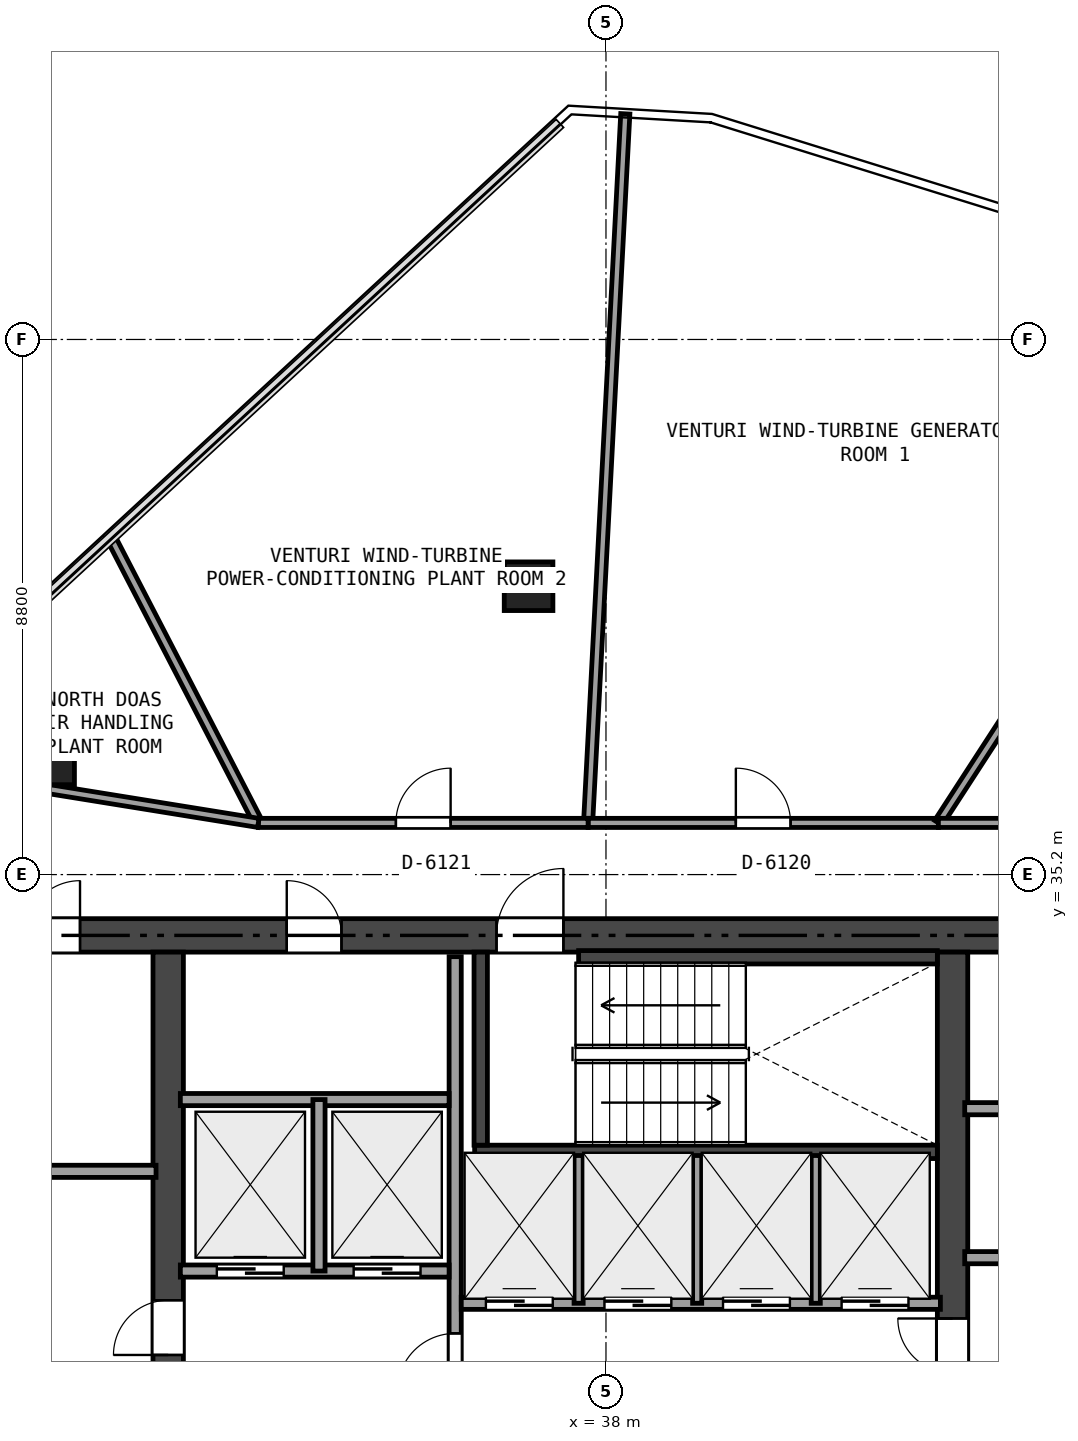
"""IFC4 building model, lengths in metres.
Left out: names, types, materials, properties, quantities, classifications, styles, units other than length and angle.
Written with IfcOpenShell. Run it as: python <this file> out.ifc"""

import sys

from ifc_helpers import new_model, si_unit, direction, frame, frame_2d, origin, origin_2d, place, context, subcontext, project, spatial, rectangle, extrude, element, fill, save


model = new_model("IFC4")
c1 = context("Model", 3, precision=1e-05, world=origin(), true_north=direction((0.0, 1.0)))
c2 = subcontext(c1, "Body", "Model", "MODEL_VIEW")
j1 = project(units=[si_unit("LENGTHUNIT", "METRE"), si_unit("PLANEANGLEUNIT", "RADIAN")], contexts=[c1])
p1 = place(None, origin())
s1 = spatial("IfcSite", under=j1, at=p1, CompositionType="ELEMENT")
p2 = place(p1, origin())
s2 = spatial("IfcBuilding", under=s1, at=p2, CompositionType="ELEMENT")
p3 = place(p2, frame((0.0, 0.0, 228.3)))
s3 = spatial("IfcBuildingStorey", under=s2, at=p3, CompositionType="ELEMENT", Elevation=228.3)
p4 = place(p3, frame((26.525, 34.2, 0.0), z_axis=(0.0, 0.0, 1.0), x_axis=(1.0, 0.0, 0.0)))
e1 = element("IfcWall", 1, at=p4, inside=s3, PredefinedType="SHEAR", context=c2, shape_type="SweptSolid", body=[
    extrude(rectangle(XDim=21.35, YDim=0.55, at=frame_2d((10.675, 0.0))), origin(), (0.0, 0.0, 1.0), 3.24),
])
p5 = place(p4, frame((9.675, 0.0, 0.0)))
e2 = element("IfcOpeningElement", 2, at=p5, cuts=e1, PredefinedType="OPENING", context=c2, shape_type="SweptSolid", body=[
    extrude(rectangle(XDim=1.1, YDim=2.15, at=frame_2d((0.55, 1.075))), frame((0.0, 0.285, 0.0), z_axis=(0.0, -1.0, 0.0), x_axis=(1.0, 0.0, 0.0)), (0.0, 0.0, 1.0), 0.57),
])
p6 = place(p4, frame((1.925, 0.0, 0.0)))
e3 = element("IfcOpeningElement", 3, at=p6, cuts=e1, PredefinedType="OPENING", context=c2, shape_type="SweptSolid", body=[
    extrude(rectangle(XDim=0.9, YDim=2.1, at=frame_2d((0.45, 1.05))), frame((0.0, 0.285, 0.0), z_axis=(0.0, -1.0, 0.0), x_axis=(1.0, 0.0, 0.0)), (0.0, 0.0, 1.0), 0.57),
])
p7 = place(p4, frame((6.225, 0.0, 0.0)))
e4 = element("IfcOpeningElement", 4, at=p7, cuts=e1, PredefinedType="OPENING", context=c2, shape_type="SweptSolid", body=[
    extrude(rectangle(XDim=0.9, YDim=2.1, at=frame_2d((0.45, 1.05))), frame((0.0, 0.285, 0.0), z_axis=(0.0, -1.0, 0.0), x_axis=(1.0, 0.0, 0.0)), (0.0, 0.0, 1.0), 0.57),
])
p8 = place(p3, frame((30.8, 18.875, 0.0), z_axis=(0.0, 0.0, 1.0), x_axis=(0.0, 1.0, 0.0)))
e5 = element("IfcWall", 5, at=p8, inside=s3, PredefinedType="SHEAR", context=c2, shape_type="SweptSolid", body=[
    extrude(rectangle(XDim=15.05, YDim=0.5, at=frame_2d((7.525, 0.0))), origin(), (0.0, 0.0, 1.0), 3.24),
])
p9 = place(p8, frame((6.625, 0.0, 0.0)))
e6 = element("IfcOpeningElement", 6, at=p9, cuts=e5, PredefinedType="OPENING", context=c2, shape_type="SweptSolid", body=[
    extrude(rectangle(XDim=1.1, YDim=2.15, at=frame_2d((0.55, 1.075))), frame((0.0, 0.26, 0.0), z_axis=(0.0, -1.0, 0.0), x_axis=(1.0, 0.0, 0.0)), (0.0, 0.0, 1.0), 0.52),
])
p10 = place(p8, frame((8.425, 0.0, 0.0)))
e7 = element("IfcOpeningElement", 7, at=p10, cuts=e5, PredefinedType="OPENING", context=c2, shape_type="SweptSolid", body=[
    extrude(rectangle(XDim=0.9, YDim=2.1, at=frame_2d((0.45, 1.05))), frame((0.0, 0.26, 0.0), z_axis=(0.0, -1.0, 0.0), x_axis=(1.0, 0.0, 0.0)), (0.0, 0.0, 1.0), 0.52),
])
p11 = place(p3, frame((43.7, 18.875, 0.0), z_axis=(0.0, 0.0, 1.0), x_axis=(0.0, 1.0, 0.0)))
e8 = element("IfcWall", 8, at=p11, inside=s3, PredefinedType="SHEAR", context=c2, shape_type="SweptSolid", body=[
    extrude(rectangle(XDim=15.05, YDim=0.5, at=frame_2d((7.525, 0.0))), origin(), (0.0, 0.0, 1.0), 3.24),
])
p12 = place(p11, frame((8.125, 0.0, 0.0)))
e9 = element("IfcOpeningElement", 9, at=p12, cuts=e8, PredefinedType="OPENING", context=c2, shape_type="SweptSolid", body=[
    extrude(rectangle(XDim=0.9, YDim=2.1, at=frame_2d((0.45, 1.05))), frame((0.0, 0.26, 0.0), z_axis=(0.0, -1.0, 0.0), x_axis=(1.0, 0.0, 0.0)), (0.0, 0.0, 1.0), 0.52),
])
p13 = place(p3, frame((35.84, 30.64, 0.0), z_axis=(0.0, 0.0, 1.0), x_axis=(1.0, 0.0, 0.0)))
e10 = element("IfcWall", 10, at=p13, inside=s3, PredefinedType="SHEAR", context=c2, shape_type="SweptSolid", body=[
    extrude(rectangle(XDim=7.61, YDim=0.22, at=frame_2d((3.805, 0.0))), origin(), (0.0, 0.0, 1.0), 3.24),
])
p14 = place(p3, frame((35.94, 30.75, 0.0), z_axis=(0.0, 0.0, 1.0), x_axis=(0.0, 1.0, 0.0)))
e11 = element("IfcWall", 11, at=p14, inside=s3, PredefinedType="SHEAR", context=c2, shape_type="SweptSolid", body=[
    extrude(rectangle(XDim=3.175, YDim=0.22, at=frame_2d((1.587, 0.0))), origin(), (0.0, 0.0, 1.0), 3.24),
])
p15 = place(p3, frame((37.55, 33.84, 0.0), z_axis=(0.0, 0.0, 1.0), x_axis=(1.0, 0.0, 0.0)))
e12 = element("IfcWall", 12, at=p15, inside=s3, PredefinedType="SHEAR", context=c2, shape_type="SweptSolid", body=[
    extrude(rectangle(XDim=5.9, YDim=0.22, at=frame_2d((2.95, 0.0))), origin(), (0.0, 0.0, 1.0), 3.24),
])
for number, where, z_axis, x_axis in (
    (13, (36.727, 39.942, -0.345), (0.0, 0.0, 1.0), (1.0, 0.0, 0.0)),
    (14, (28.858, 37.078, -0.345), (0.0, 0.0, 1.0), (1.0, 0.0, 0.0)),
):
    element("IfcColumn", number, at=place(p3, frame(where, z_axis=z_axis, x_axis=x_axis)), inside=s3, PredefinedType="COLUMN", context=c2, shape_type="SweptSolid", body=[
        extrude(rectangle(XDim=0.8, YDim=0.8, at=origin_2d()), origin(), (0.0, 0.0, 1.0), 3.585),
    ])
p16 = place(p3, frame((27.15, 30.32, 0.0), z_axis=(0.0, 0.0, 1.0), x_axis=(1.0, 0.0, 0.0)))
e15 = element("IfcWall", 15, at=p16, inside=s3, PredefinedType="SOLIDWALL", context=c2, shape_type="SweptSolid", body=[
    extrude(rectangle(XDim=3.45, YDim=0.2, at=frame_2d((1.725, 0.0))), origin(), (0.0, 0.0, 1.0), 2.913),
])
p17 = place(p3, frame((43.9, 28.9, 0.0), z_axis=(0.0, 0.0, 1.0), x_axis=(1.0, 0.0, 0.0)))
e16 = element("IfcWall", 16, at=p17, inside=s3, PredefinedType="SOLIDWALL", context=c2, shape_type="SweptSolid", body=[
    extrude(rectangle(XDim=3.35, YDim=0.2, at=frame_2d((1.675, 0.0))), origin(), (0.0, 0.0, 1.0), 3.24),
])
p18 = place(p17, frame((1.15, 0.0, 0.0)))
e17 = element("IfcOpeningElement", 17, at=p18, cuts=e16, PredefinedType="OPENING", context=c2, shape_type="SweptSolid", body=[
    extrude(rectangle(XDim=0.9, YDim=2.1, at=frame_2d((0.45, 1.05))), frame((0.0, 0.11, 0.0), z_axis=(0.0, -1.0, 0.0), x_axis=(1.0, 0.0, 0.0)), (0.0, 0.0, 1.0), 0.22),
])
p19 = place(p3, frame((43.9, 31.35, 0.0), z_axis=(0.0, 0.0, 1.0), x_axis=(1.0, 0.0, 0.0)))
e18 = element("IfcWall", 18, at=p19, inside=s3, PredefinedType="SOLIDWALL", context=c2, shape_type="SweptSolid", body=[
    extrude(rectangle(XDim=3.35, YDim=0.2, at=frame_2d((1.675, 0.0))), origin(), (0.0, 0.0, 1.0), 2.913),
])
p20 = place(p3, frame((35.52, 18.95, 0.0), z_axis=(0.0, 0.0, 1.0), x_axis=(0.0, 1.0, 0.0)))
e19 = element("IfcWall", 19, at=p20, inside=s3, PredefinedType="SOLIDWALL", context=c2, shape_type="SweptSolid", body=[
    extrude(rectangle(XDim=14.9, YDim=0.2, at=frame_2d((7.45, 0.0))), origin(), (0.0, 0.0, 1.0), 2.761),
])
p21 = place(p20, frame((7.755, 0.0, 0.0)))
e20 = element("IfcOpeningElement", 20, at=p21, cuts=e19, PredefinedType="OPENING", context=c2, shape_type="SweptSolid", body=[
    extrude(rectangle(XDim=0.95, YDim=2.15, at=frame_2d((0.475, 1.075))), frame((0.0, 0.11, 0.0), z_axis=(0.0, -1.0, 0.0), x_axis=(1.0, 0.0, 0.0)), (0.0, 0.0, 1.0), 0.22),
])
p22 = place(p20, frame((0.6, 0.0, 0.0)))
e21 = element("IfcOpeningElement", 21, at=p22, cuts=e19, PredefinedType="OPENING", context=c2, shape_type="SweptSolid", body=[
    extrude(rectangle(XDim=0.9, YDim=2.1, at=frame_2d((0.45, 1.05))), frame((0.0, 0.11, 0.0), z_axis=(0.0, -1.0, 0.0), x_axis=(1.0, 0.0, 0.0)), (0.0, 0.0, 1.0), 0.22),
])
p23 = place(p3, frame((31.0, 28.68, 0.0), z_axis=(0.0, 0.0, 1.0), x_axis=(1.0, 0.0, 0.0)))
e22 = element("IfcWall", 22, at=p23, inside=s3, PredefinedType="SOLIDWALL", context=c2, shape_type="SweptSolid", body=[
    extrude(rectangle(XDim=4.42, YDim=0.2, at=frame_2d((2.21, 0.0))), origin(), (0.0, 0.0, 1.0), 3.24),
])
p24 = place(p23, frame((0.6, 0.0, 0.0)))
e23 = element("IfcOpeningElement", 23, at=p24, cuts=e22, PredefinedType="OPENING", context=c2, shape_type="SweptSolid", body=[
    extrude(rectangle(XDim=1.1, YDim=2.15, at=frame_2d((0.55, 1.075))), frame((0.0, 0.11, 0.0), z_axis=(0.0, -1.0, 0.0), x_axis=(1.0, 0.0, 0.0)), (0.0, 0.0, 1.0), 0.22),
])
p25 = place(p23, frame((2.85, 0.0, 0.0)))
e24 = element("IfcOpeningElement", 24, at=p25, cuts=e22, PredefinedType="OPENING", context=c2, shape_type="SweptSolid", body=[
    extrude(rectangle(XDim=1.1, YDim=2.15, at=frame_2d((0.55, 1.075))), frame((0.0, 0.11, 0.0), z_axis=(0.0, -1.0, 0.0), x_axis=(1.0, 0.0, 0.0)), (0.0, 0.0, 1.0), 0.22),
])
p26 = place(p3, frame((31.0, 31.5, 0.0), z_axis=(0.0, 0.0, 1.0), x_axis=(1.0, 0.0, 0.0)))
e25 = element("IfcWall", 25, at=p26, inside=s3, PredefinedType="SOLIDWALL", context=c2, shape_type="SweptSolid", body=[
    extrude(rectangle(XDim=4.42, YDim=0.2, at=frame_2d((2.21, 0.0))), origin(), (0.0, 0.0, 1.0), 3.24),
])
p27 = place(p3, frame((33.28, 28.68, 0.0), z_axis=(0.0, 0.0, 1.0), x_axis=(0.0, 1.0, 0.0)))
e26 = element("IfcWall", 26, at=p27, inside=s3, PredefinedType="SOLIDWALL", context=c2, shape_type="SweptSolid", body=[
    extrude(rectangle(XDim=2.82, YDim=0.2, at=frame_2d((1.41, 0.0))), origin(), (0.0, 0.0, 1.0), 3.24),
])
p28 = place(p3, frame((35.62, 28.15, 0.0), z_axis=(0.0, 0.0, 1.0), x_axis=(1.0, 0.0, 0.0)))
e27 = element("IfcWall", 27, at=p28, inside=s3, PredefinedType="SOLIDWALL", context=c2, shape_type="SweptSolid", body=[
    extrude(rectangle(XDim=7.88, YDim=0.2, at=frame_2d((3.94, 0.0))), origin(), (0.0, 0.0, 1.0), 3.24),
])
p29 = place(p28, frame((0.405, 0.0, 0.0)))
e28 = element("IfcOpeningElement", 28, at=p29, cuts=e27, PredefinedType="OPENING", context=c2, shape_type="SweptSolid", body=[
    extrude(rectangle(XDim=1.1, YDim=2.15, at=frame_2d((0.55, 1.075))), frame((0.0, 0.11, 0.0), z_axis=(0.0, -1.0, 0.0), x_axis=(1.0, 0.0, 0.0)), (0.0, 0.0, 1.0), 0.22),
])
p30 = place(p28, frame((2.355, 0.0, 0.0)))
e29 = element("IfcOpeningElement", 29, at=p30, cuts=e27, PredefinedType="OPENING", context=c2, shape_type="SweptSolid", body=[
    extrude(rectangle(XDim=1.1, YDim=2.15, at=frame_2d((0.55, 1.075))), frame((0.0, 0.11, 0.0), z_axis=(0.0, -1.0, 0.0), x_axis=(1.0, 0.0, 0.0)), (0.0, 0.0, 1.0), 0.22),
])
p31 = place(p28, frame((4.305, 0.0, 0.0)))
e30 = element("IfcOpeningElement", 30, at=p31, cuts=e27, PredefinedType="OPENING", context=c2, shape_type="SweptSolid", body=[
    extrude(rectangle(XDim=1.1, YDim=2.15, at=frame_2d((0.55, 1.075))), frame((0.0, 0.11, 0.0), z_axis=(0.0, -1.0, 0.0), x_axis=(1.0, 0.0, 0.0)), (0.0, 0.0, 1.0), 0.22),
])
p32 = place(p28, frame((6.255, 0.0, 0.0)))
e31 = element("IfcOpeningElement", 31, at=p32, cuts=e27, PredefinedType="OPENING", context=c2, shape_type="SweptSolid", body=[
    extrude(rectangle(XDim=1.1, YDim=2.15, at=frame_2d((0.55, 1.075))), frame((0.0, 0.11, 0.0), z_axis=(0.0, -1.0, 0.0), x_axis=(1.0, 0.0, 0.0)), (0.0, 0.0, 1.0), 0.22),
])
for number, where, z_axis, x_axis in (
    (32, (37.55, 28.15, 0.0), (0.0, 0.0, 1.0), (0.0, 1.0, 0.0)),
    (33, (39.5, 28.15, 0.0), (0.0, 0.0, 1.0), (0.0, 1.0, 0.0)),
    (34, (41.45, 28.15, 0.0), (0.0, 0.0, 1.0), (0.0, 1.0, 0.0)),
):
    element("IfcWall", number, at=place(p3, frame(where, z_axis=z_axis, x_axis=x_axis)), inside=s3, PredefinedType="PARTITIONING", context=c2, shape_type="SweptSolid", body=[
        extrude(rectangle(XDim=2.43, YDim=0.15, at=frame_2d((1.215, 0.0))), origin(), (0.0, 0.0, 1.0), 3.24),
    ])
p33 = place(p3, frame((38.318, 47.711, 0.0), z_axis=(0.0, 0.0, 1.0), x_axis=(-0.052416173525, -0.998625327514, 0.0)))
e35 = element("IfcWall", 35, at=p33, inside=s3, PredefinedType="PARTITIONING", context=c2, shape_type="SweptSolid", body=[
    extrude(rectangle(XDim=11.677, YDim=0.15, at=frame_2d((5.838, 0.0))), origin(), (0.0, 0.0, 1.0), 2.765),
])
p34 = place(p3, frame((37.706, 36.05, 0.0), z_axis=(0.0, 0.0, 1.0), x_axis=(1.0, 0.0, 0.0)))
e36 = element("IfcWall", 36, at=p34, inside=s3, PredefinedType="PARTITIONING", context=c2, shape_type="SweptSolid", body=[
    extrude(rectangle(XDim=5.761, YDim=0.15, at=frame_2d((2.88, 0.0))), origin(), (0.0, 0.0, 1.0), 2.913),
])
p35 = place(p34, frame((2.43, 0.0, 0.0)))
e37 = element("IfcOpeningElement", 37, at=p35, cuts=e36, PredefinedType="OPENING", context=c2, shape_type="SweptSolid", body=[
    extrude(rectangle(XDim=0.9, YDim=2.0, at=frame_2d((0.45, 1.0))), frame((0.0, 0.085, 0.0), z_axis=(0.0, -1.0, 0.0), x_axis=(1.0, 0.0, 0.0)), (0.0, 0.0, 1.0), 0.17),
])
p36 = place(p3, frame((43.467, 36.05, 0.0), z_axis=(0.0, 0.0, 1.0), x_axis=(0.544343030284, 0.838862721416, 0.0)))
e38 = element("IfcWall", 38, at=p36, inside=s3, PredefinedType="PARTITIONING", context=c2, shape_type="SweptSolid", body=[
    extrude(rectangle(XDim=9.843, YDim=0.15, at=frame_2d((4.921, 0.0))), origin(), (0.0, 0.0, 1.0), 2.765),
])
p37 = place(p3, frame((29.839, 40.775, 0.0), z_axis=(0.0, 0.0, 1.0), x_axis=(0.459416676004, -0.888220872199, 0.0)))
e39 = element("IfcWall", 39, at=p37, inside=s3, PredefinedType="PARTITIONING", context=c2, shape_type="SweptSolid", body=[
    extrude(rectangle(XDim=5.319, YDim=0.15, at=frame_2d((2.66, 0.0))), origin(), (0.0, 0.0, 1.0), 2.765),
])
p38 = place(p3, frame((32.283, 36.05, 0.0), z_axis=(0.0, 0.0, 1.0), x_axis=(1.0, 0.0, 0.0)))
e40 = element("IfcWall", 40, at=p38, inside=s3, PredefinedType="PARTITIONING", context=c2, shape_type="SweptSolid", body=[
    extrude(rectangle(XDim=5.423, YDim=0.15, at=frame_2d((2.711, 0.0))), origin(), (0.0, 0.0, 1.0), 2.689),
])
p39 = place(p38, frame((2.262, 0.0, 0.0)))
e41 = element("IfcOpeningElement", 41, at=p39, cuts=e40, PredefinedType="OPENING", context=c2, shape_type="SweptSolid", body=[
    extrude(rectangle(XDim=0.9, YDim=2.0, at=frame_2d((0.45, 1.0))), frame((0.0, 0.085, 0.0), z_axis=(0.0, -1.0, 0.0), x_axis=(1.0, 0.0, 0.0)), (0.0, 0.0, 1.0), 0.17),
])
p40 = place(p3, frame((25.85, 37.087, 0.0), z_axis=(0.0, 0.0, 1.0), x_axis=(0.987257835499, -0.159128772529, 0.0)))
e42 = element("IfcWall", 42, at=p40, inside=s3, PredefinedType="PARTITIONING", context=c2, shape_type="SweptSolid", body=[
    extrude(rectangle(XDim=6.516, YDim=0.15, at=frame_2d((3.258, 0.0))), origin(), (0.0, 0.0, 1.0), 2.689),
])
p41 = place(p40, frame((0.24, 0.0, 0.0)))
e43 = element("IfcOpeningElement", 43, at=p41, cuts=e42, PredefinedType="OPENING", context=c2, shape_type="SweptSolid", body=[
    extrude(rectangle(XDim=0.9, YDim=2.0, at=frame_2d((0.45, 1.0))), frame((0.0, 0.085, 0.0), z_axis=(0.0, -1.0, 0.0), x_axis=(1.0, 0.0, 0.0)), (0.0, 0.0, 1.0), 0.17),
])
p42 = place(p3, frame((43.467, 36.05, 0.0), z_axis=(0.0, 0.0, 1.0), x_axis=(1.0, 0.0, 0.0)))
e44 = element("IfcWall", 44, at=p42, inside=s3, PredefinedType="PARTITIONING", context=c2, shape_type="SweptSolid", body=[
    extrude(rectangle(XDim=5.983, YDim=0.15, at=frame_2d((2.991, 0.0))), origin(), (0.0, 0.0, 1.0), 2.689),
])
p43 = place(p42, frame((3.199, 0.0, 0.0)))
e45 = element("IfcOpeningElement", 45, at=p43, cuts=e44, PredefinedType="OPENING", context=c2, shape_type="SweptSolid", body=[
    extrude(rectangle(XDim=0.9, YDim=2.0, at=frame_2d((0.45, 1.0))), frame((0.0, 0.085, 0.0), z_axis=(0.0, -1.0, 0.0), x_axis=(1.0, 0.0, 0.0)), (0.0, 0.0, 1.0), 0.17),
])
p44 = place(p5, origin())
e46 = element("IfcDoor", 46, at=p44, inside=s3, OperationType="SINGLE_SWING_RIGHT", PredefinedType="DOOR", context=c2, shape_type="SweptSolid", body=[
    extrude(rectangle(XDim=1.1, YDim=2.15, at=frame_2d((0.55, 1.075))), frame((0.0, 0.025, 0.0), z_axis=(0.0, -1.0, 0.0), x_axis=(1.0, 0.0, 0.0)), (0.0, 0.0, 1.0), 0.05),
])
fill(e2, e46)
p45 = place(p21, origin())
e47 = element("IfcDoor", 47, at=p45, inside=s3, OperationType="SINGLE_SWING_LEFT", PredefinedType="DOOR", context=c2, shape_type="SweptSolid", body=[
    extrude(rectangle(XDim=0.95, YDim=2.15, at=frame_2d((0.475, 1.075))), frame((0.0, 0.025, 0.0), z_axis=(0.0, -1.0, 0.0), x_axis=(1.0, 0.0, 0.0)), (0.0, 0.0, 1.0), 0.05),
])
fill(e20, e47)
p46 = place(p12, origin())
e48 = element("IfcDoor", 48, at=p46, inside=s3, OperationType="SINGLE_SWING_RIGHT", PredefinedType="DOOR", context=c2, shape_type="SweptSolid", body=[
    extrude(rectangle(XDim=0.9, YDim=2.1, at=frame_2d((0.45, 1.05))), frame((0.0, 0.025, 0.0), z_axis=(0.0, -1.0, 0.0), x_axis=(1.0, 0.0, 0.0)), (0.0, 0.0, 1.0), 0.05),
])
fill(e9, e48)
p47 = place(p10, origin())
e49 = element("IfcDoor", 49, at=p47, inside=s3, OperationType="SINGLE_SWING_LEFT", PredefinedType="DOOR", context=c2, shape_type="SweptSolid", body=[
    extrude(rectangle(XDim=0.9, YDim=2.1, at=frame_2d((0.45, 1.05))), frame((0.0, 0.025, 0.0), z_axis=(0.0, -1.0, 0.0), x_axis=(1.0, 0.0, 0.0)), (0.0, 0.0, 1.0), 0.05),
])
fill(e7, e49)
p48 = place(p6, origin())
e50 = element("IfcDoor", 50, at=p48, inside=s3, OperationType="SINGLE_SWING_RIGHT", PredefinedType="DOOR", context=c2, shape_type="SweptSolid", body=[
    extrude(rectangle(XDim=0.9, YDim=2.1, at=frame_2d((0.45, 1.05))), frame((0.0, 0.025, 0.0), z_axis=(0.0, -1.0, 0.0), x_axis=(1.0, 0.0, 0.0)), (0.0, 0.0, 1.0), 0.05),
])
fill(e3, e50)
p49 = place(p7, origin())
e51 = element("IfcDoor", 51, at=p49, inside=s3, OperationType="SINGLE_SWING_LEFT", PredefinedType="DOOR", context=c2, shape_type="SweptSolid", body=[
    extrude(rectangle(XDim=0.9, YDim=2.1, at=frame_2d((0.45, 1.05))), frame((0.0, 0.025, 0.0), z_axis=(0.0, -1.0, 0.0), x_axis=(1.0, 0.0, 0.0)), (0.0, 0.0, 1.0), 0.05),
])
fill(e4, e51)
p50 = place(p24, origin())
e52 = element("IfcDoor", 52, at=p50, inside=s3, OperationType="SLIDING_TO_LEFT", PredefinedType="DOOR", context=c2, shape_type="SweptSolid", body=[
    extrude(rectangle(XDim=1.1, YDim=2.15, at=frame_2d((0.55, 1.075))), frame((0.0, 0.025, 0.0), z_axis=(0.0, -1.0, 0.0), x_axis=(1.0, 0.0, 0.0)), (0.0, 0.0, 1.0), 0.05),
])
fill(e23, e52)
p51 = place(p25, origin())
e53 = element("IfcDoor", 53, at=p51, inside=s3, OperationType="SLIDING_TO_LEFT", PredefinedType="DOOR", context=c2, shape_type="SweptSolid", body=[
    extrude(rectangle(XDim=1.1, YDim=2.15, at=frame_2d((0.55, 1.075))), frame((0.0, 0.025, 0.0), z_axis=(0.0, -1.0, 0.0), x_axis=(1.0, 0.0, 0.0)), (0.0, 0.0, 1.0), 0.05),
])
fill(e24, e53)
p52 = place(p29, origin())
e54 = element("IfcDoor", 54, at=p52, inside=s3, OperationType="SLIDING_TO_LEFT", PredefinedType="DOOR", context=c2, shape_type="SweptSolid", body=[
    extrude(rectangle(XDim=1.1, YDim=2.15, at=frame_2d((0.55, 1.075))), frame((0.0, 0.025, 0.0), z_axis=(0.0, -1.0, 0.0), x_axis=(1.0, 0.0, 0.0)), (0.0, 0.0, 1.0), 0.05),
])
fill(e28, e54)
p53 = place(p30, origin())
e55 = element("IfcDoor", 55, at=p53, inside=s3, OperationType="SLIDING_TO_LEFT", PredefinedType="DOOR", context=c2, shape_type="SweptSolid", body=[
    extrude(rectangle(XDim=1.1, YDim=2.15, at=frame_2d((0.55, 1.075))), frame((0.0, 0.025, 0.0), z_axis=(0.0, -1.0, 0.0), x_axis=(1.0, 0.0, 0.0)), (0.0, 0.0, 1.0), 0.05),
])
fill(e29, e55)
p54 = place(p31, origin())
e56 = element("IfcDoor", 56, at=p54, inside=s3, OperationType="SLIDING_TO_LEFT", PredefinedType="DOOR", context=c2, shape_type="SweptSolid", body=[
    extrude(rectangle(XDim=1.1, YDim=2.15, at=frame_2d((0.55, 1.075))), frame((0.0, 0.025, 0.0), z_axis=(0.0, -1.0, 0.0), x_axis=(1.0, 0.0, 0.0)), (0.0, 0.0, 1.0), 0.05),
])
fill(e30, e56)
p55 = place(p32, origin())
e57 = element("IfcDoor", 57, at=p55, inside=s3, OperationType="SLIDING_TO_LEFT", PredefinedType="DOOR", context=c2, shape_type="SweptSolid", body=[
    extrude(rectangle(XDim=1.1, YDim=2.15, at=frame_2d((0.55, 1.075))), frame((0.0, 0.025, 0.0), z_axis=(0.0, -1.0, 0.0), x_axis=(1.0, 0.0, 0.0)), (0.0, 0.0, 1.0), 0.05),
])
fill(e31, e57)
p56 = place(p35, origin())
e58 = element("IfcDoor", 58, at=p56, inside=s3, OperationType="SINGLE_SWING_LEFT", PredefinedType="DOOR", context=c2, shape_type="SweptSolid", body=[
    extrude(rectangle(XDim=0.9, YDim=2.0, at=frame_2d((0.45, 1.0))), frame((0.0, 0.025, 0.0), z_axis=(0.0, -1.0, 0.0), x_axis=(1.0, 0.0, 0.0)), (0.0, 0.0, 1.0), 0.05),
])
fill(e37, e58)
p57 = place(p39, origin())
e59 = element("IfcDoor", 59, at=p57, inside=s3, OperationType="SINGLE_SWING_RIGHT", PredefinedType="DOOR", context=c2, shape_type="SweptSolid", body=[
    extrude(rectangle(XDim=0.9, YDim=2.0, at=frame_2d((0.45, 1.0))), frame((0.0, 0.025, 0.0), z_axis=(0.0, -1.0, 0.0), x_axis=(1.0, 0.0, 0.0)), (0.0, 0.0, 1.0), 0.05),
])
fill(e41, e59)
save(model, sys.argv[1])
